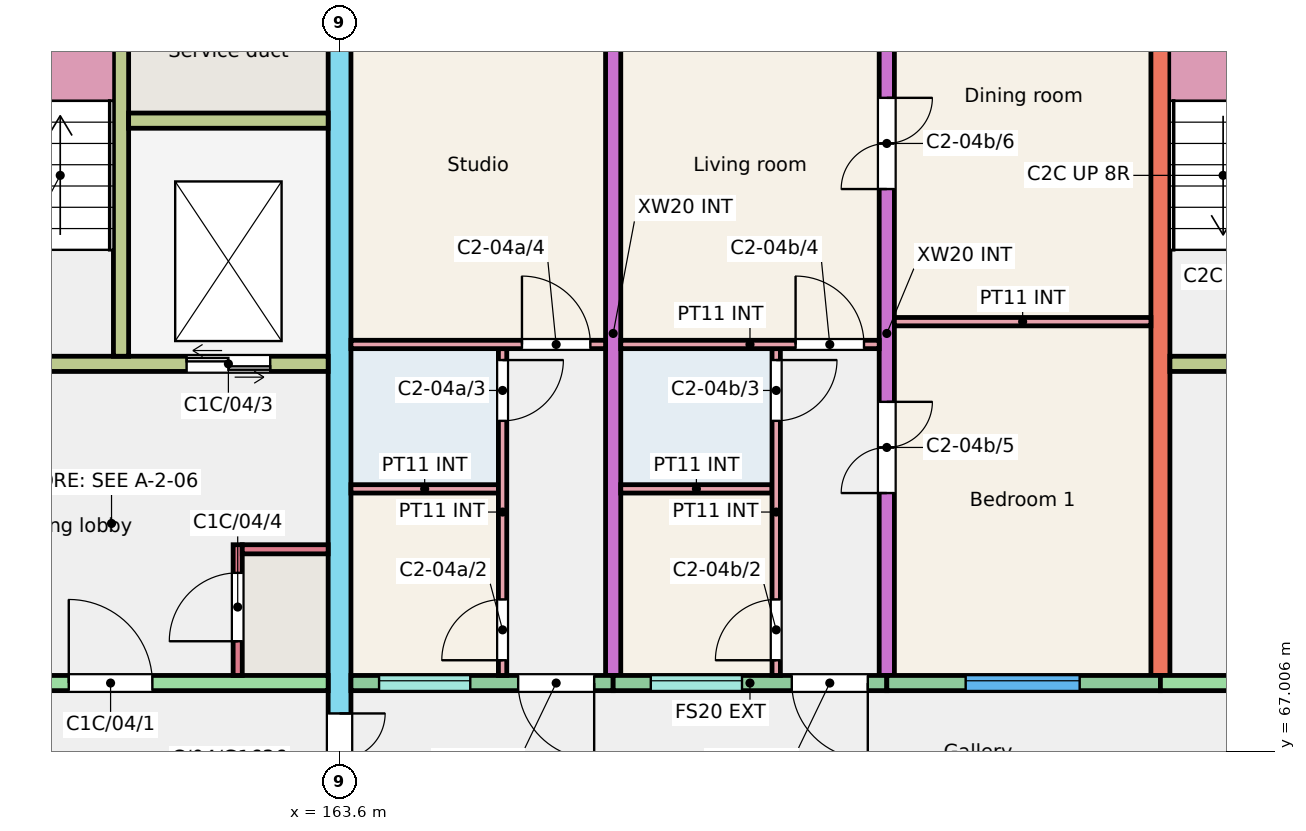
"""IFC4 building model, lengths in metres.
Left out: names, types, materials, properties, quantities, classifications, styles, units other than length and angle.
Written with IfcOpenShell. Run it as: python <this file> out.ifc"""

import sys

from ifc_helpers import new_model, si_unit, direction, frame, frame_2d, origin, place, context, subcontext, project, spatial, rectangle, extrude, element, fill, save


model = new_model("IFC4")
c1 = context("Model", 3, precision=1e-05, world=origin(), true_north=direction((0.0, 1.0)))
c2 = subcontext(c1, "Body", "Model", "MODEL_VIEW")
j1 = project(units=[si_unit("LENGTHUNIT", "METRE"), si_unit("PLANEANGLEUNIT", "RADIAN")], contexts=[c1])
p1 = place(None, origin())
s1 = spatial("IfcSite", under=j1, at=p1, CompositionType="ELEMENT")
p2 = place(p1, origin())
s2 = spatial("IfcBuilding", under=s1, at=p2, CompositionType="ELEMENT")
p3 = place(p2, frame((0.0, 0.0, 12.0)))
s3 = spatial("IfcBuildingStorey", under=s2, at=p3, CompositionType="ELEMENT", Elevation=12.0)
p4 = place(p3, frame((163.6, 66.0, 0.0), z_axis=(0.0, 0.0, 1.0), x_axis=(0.0, 1.0, 0.0)))
e1 = element("IfcWall", 1, at=p4, inside=s3, PredefinedType="SHEAR", context=c2, shape_type="SweptSolid", body=[
    extrude(rectangle(XDim=11.0, YDim=0.3, at=frame_2d((5.5, 0.0))), origin(), (0.0, 0.0, 1.0), 3.0),
])
p5 = place(p4, frame((0.3, 0.0, 0.0)))
e2 = element("IfcOpeningElement", 2, at=p5, cuts=e1, PredefinedType="OPENING", context=c2, shape_type="SweptSolid", body=[
    extrude(rectangle(XDim=1.2, YDim=2.1, at=frame_2d((0.6, 1.05))), frame((0.0, 0.16, 0.0), z_axis=(0.0, -1.0, 0.0), x_axis=(1.0, 0.0, 0.0)), (0.0, 0.0, 1.0), 0.32),
])
p6 = place(p3, frame((167.2, 68.0, 0.0), z_axis=(0.0, 0.0, 1.0), x_axis=(0.0, 1.0, 0.0)))
e3 = element("IfcWall", 3, at=p6, inside=s3, PredefinedType="SHEAR", context=c2, shape_type="SweptSolid", body=[
    extrude(rectangle(XDim=9.0, YDim=0.2, at=frame_2d((4.5, 0.0))), origin(), (0.0, 0.0, 1.0), 3.0),
])
p7 = place(p3, frame((170.8, 68.0, 0.0), z_axis=(0.0, 0.0, 1.0), x_axis=(0.0, 1.0, 0.0)))
e4 = element("IfcWall", 4, at=p7, inside=s3, PredefinedType="SHEAR", context=c2, shape_type="SweptSolid", body=[
    extrude(rectangle(XDim=9.0, YDim=0.2, at=frame_2d((4.5, 0.0))), origin(), (0.0, 0.0, 1.0), 3.0),
])
p8 = place(p7, frame((2.4, 0.0, 0.0)))
e5 = element("IfcOpeningElement", 5, at=p8, cuts=e4, PredefinedType="OPENING", context=c2, shape_type="SweptSolid", body=[
    extrude(rectangle(XDim=1.2, YDim=2.1, at=frame_2d((0.6, 1.05))), frame((0.0, 0.11, 0.0), z_axis=(0.0, -1.0, 0.0), x_axis=(1.0, 0.0, 0.0)), (0.0, 0.0, 1.0), 0.22),
])
p9 = place(p7, frame((6.4, 0.0, 0.0)))
e6 = element("IfcOpeningElement", 6, at=p9, cuts=e4, PredefinedType="OPENING", context=c2, shape_type="SweptSolid", body=[
    extrude(rectangle(XDim=1.2, YDim=2.1, at=frame_2d((0.6, 1.05))), frame((0.0, 0.11, 0.0), z_axis=(0.0, -1.0, 0.0), x_axis=(1.0, 0.0, 0.0)), (0.0, 0.0, 1.0), 0.22),
])
p10 = place(p3, frame((174.4, 68.0, 0.0), z_axis=(0.0, 0.0, 1.0), x_axis=(0.0, 1.0, 0.0)))
e7 = element("IfcWall", 7, at=p10, inside=s3, PredefinedType="SHEAR", context=c2, shape_type="SweptSolid", body=[
    extrude(rectangle(XDim=9.0, YDim=0.25, at=frame_2d((4.5, 0.0))), origin(), (0.0, 0.0, 1.0), 3.0),
])
p11 = place(p3, frame((157.6, 67.9, 0.0), z_axis=(0.0, 0.0, 1.0), x_axis=(1.0, 0.0, 0.0)))
e8 = element("IfcWall", 8, at=p11, inside=s3, PredefinedType="SHEAR", context=c2, shape_type="SweptSolid", body=[
    extrude(rectangle(XDim=5.85, YDim=0.2, at=frame_2d((2.925, 0.0))), origin(), (0.0, 0.0, 1.0), 3.0),
])
p12 = place(p11, frame((2.438, 0.0, 0.0)))
e9 = element("IfcOpeningElement", 9, at=p12, cuts=e8, PredefinedType="OPENING", context=c2, shape_type="SweptSolid", body=[
    extrude(rectangle(XDim=1.1, YDim=2.1, at=frame_2d((0.55, 1.05))), frame((0.0, 0.11, 0.0), z_axis=(0.0, -1.0, 0.0), x_axis=(1.0, 0.0, 0.0)), (0.0, 0.0, 1.0), 0.22),
])
p13 = place(p3, frame((157.725, 72.1, 0.0), z_axis=(0.0, 0.0, 1.0), x_axis=(1.0, 0.0, 0.0)))
e10 = element("IfcWall", 10, at=p13, inside=s3, PredefinedType="SHEAR", context=c2, shape_type="SweptSolid", body=[
    extrude(rectangle(XDim=5.725, YDim=0.2, at=frame_2d((2.862, 0.0))), origin(), (0.0, 0.0, 1.0), 3.0),
])
p14 = place(p13, frame((0.95, 0.0, 0.0)))
e11 = element("IfcOpeningElement", 11, at=p14, cuts=e10, PredefinedType="OPENING", context=c2, shape_type="SweptSolid", body=[
    extrude(rectangle(XDim=1.0, YDim=2.1, at=frame_2d((0.5, 1.05))), frame((0.0, 0.11, 0.0), z_axis=(0.0, -1.0, 0.0), x_axis=(1.0, 0.0, 0.0)), (0.0, 0.0, 1.0), 0.22),
])
p15 = place(p13, frame((3.863, 0.0, 0.0)))
e12 = element("IfcOpeningElement", 12, at=p15, cuts=e10, PredefinedType="OPENING", context=c2, shape_type="SweptSolid", body=[
    extrude(rectangle(XDim=1.1, YDim=2.1, at=frame_2d((0.55, 1.05))), frame((0.0, 0.11, 0.0), z_axis=(0.0, -1.0, 0.0), x_axis=(1.0, 0.0, 0.0)), (0.0, 0.0, 1.0), 0.22),
])
p16 = place(p3, frame((160.725, 72.2, 0.0), z_axis=(0.0, 0.0, 1.0), x_axis=(0.0, 1.0, 0.0)))
e13 = element("IfcWall", 13, at=p16, inside=s3, PredefinedType="SHEAR", context=c2, shape_type="SweptSolid", body=[
    extrude(rectangle(XDim=4.8, YDim=0.2, at=frame_2d((2.4, 0.0))), origin(), (0.0, 0.0, 1.0), 3.0),
])
p17 = place(p3, frame((160.825, 75.3, 0.0), z_axis=(0.0, 0.0, 1.0), x_axis=(1.0, 0.0, 0.0)))
e14 = element("IfcWall", 14, at=p17, inside=s3, PredefinedType="SHEAR", context=c2, shape_type="SweptSolid", body=[
    extrude(rectangle(XDim=2.625, YDim=0.2, at=frame_2d((1.312, 0.0))), origin(), (0.0, 0.0, 1.0), 3.0),
])
p18 = place(p3, frame((162.26, 68.0, 0.0), z_axis=(0.0, 0.0, 1.0), x_axis=(0.0, 1.0, 0.0)))
e15 = element("IfcWall", 15, at=p18, inside=s3, PredefinedType="SHEAR", context=c2, shape_type="SweptSolid", body=[
    extrude(rectangle(XDim=1.72, YDim=0.12, at=frame_2d((0.86, 0.0))), origin(), (0.0, 0.0, 1.0), 3.0),
])
p19 = place(p18, frame((0.45, 0.0, 0.0)))
e16 = element("IfcOpeningElement", 16, at=p19, cuts=e15, PredefinedType="OPENING", context=c2, shape_type="SweptSolid", body=[
    extrude(rectangle(XDim=0.9, YDim=2.1, at=frame_2d((0.45, 1.05))), frame((0.0, 0.07, 0.0), z_axis=(0.0, -1.0, 0.0), x_axis=(1.0, 0.0, 0.0)), (0.0, 0.0, 1.0), 0.14),
])
p20 = place(p3, frame((162.32, 69.66, 0.0), z_axis=(0.0, 0.0, 1.0), x_axis=(1.0, 0.0, 0.0)))
e17 = element("IfcWall", 17, at=p20, inside=s3, PredefinedType="SHEAR", context=c2, shape_type="SweptSolid", body=[
    extrude(rectangle(XDim=1.13, YDim=0.12, at=frame_2d((0.565, 0.0))), origin(), (0.0, 0.0, 1.0), 3.0),
])
p21 = place(p3, frame((163.75, 67.9, 0.0), z_axis=(0.0, 0.0, 1.0), x_axis=(1.0, 0.0, 0.0)))
e18 = element("IfcWall", 18, at=p21, inside=s3, PredefinedType="SOLIDWALL", context=c2, shape_type="SweptSolid", body=[
    extrude(rectangle(XDim=3.45, YDim=0.2, at=frame_2d((1.725, 0.0))), origin(), (0.0, 0.0, 1.0), 3.0),
])
p22 = place(p21, frame((0.37, 0.0, 1.1)))
e19 = element("IfcOpeningElement", 19, at=p22, cuts=e18, PredefinedType="OPENING", context=c2, shape_type="SweptSolid", body=[
    extrude(rectangle(XDim=1.2, YDim=1.3, at=frame_2d((0.6, 0.65))), frame((0.0, 0.11, 0.0), z_axis=(0.0, -1.0, 0.0), x_axis=(1.0, 0.0, 0.0)), (0.0, 0.0, 1.0), 0.22),
])
p23 = place(p21, frame((2.2, 0.0, 0.0)))
e20 = element("IfcOpeningElement", 20, at=p23, cuts=e18, PredefinedType="OPENING", context=c2, shape_type="SweptSolid", body=[
    extrude(rectangle(XDim=1.0, YDim=2.1, at=frame_2d((0.5, 1.05))), frame((0.0, 0.11, 0.0), z_axis=(0.0, -1.0, 0.0), x_axis=(1.0, 0.0, 0.0)), (0.0, 0.0, 1.0), 0.22),
])
p24 = place(p3, frame((167.2, 67.9, 0.0), z_axis=(0.0, 0.0, 1.0), x_axis=(1.0, 0.0, 0.0)))
e21 = element("IfcWall", 21, at=p24, inside=s3, PredefinedType="SOLIDWALL", context=c2, shape_type="SweptSolid", body=[
    extrude(rectangle(XDim=3.6, YDim=0.2, at=frame_2d((1.8, 0.0))), origin(), (0.0, 0.0, 1.0), 3.0),
])
p25 = place(p24, frame((0.495, 0.0, 1.1)))
e22 = element("IfcOpeningElement", 22, at=p25, cuts=e21, PredefinedType="OPENING", context=c2, shape_type="SweptSolid", body=[
    extrude(rectangle(XDim=1.2, YDim=1.3, at=frame_2d((0.6, 0.65))), frame((0.0, 0.11, 0.0), z_axis=(0.0, -1.0, 0.0), x_axis=(1.0, 0.0, 0.0)), (0.0, 0.0, 1.0), 0.22),
])
p26 = place(p24, frame((2.35, 0.0, 0.0)))
e23 = element("IfcOpeningElement", 23, at=p26, cuts=e21, PredefinedType="OPENING", context=c2, shape_type="SweptSolid", body=[
    extrude(rectangle(XDim=1.0, YDim=2.1, at=frame_2d((0.5, 1.05))), frame((0.0, 0.11, 0.0), z_axis=(0.0, -1.0, 0.0), x_axis=(1.0, 0.0, 0.0)), (0.0, 0.0, 1.0), 0.22),
])
p27 = place(p3, frame((170.8, 67.9, 0.0), z_axis=(0.0, 0.0, 1.0), x_axis=(1.0, 0.0, 0.0)))
e24 = element("IfcWall", 24, at=p27, inside=s3, PredefinedType="SOLIDWALL", context=c2, shape_type="SweptSolid", body=[
    extrude(rectangle(XDim=3.6, YDim=0.2, at=frame_2d((1.8, 0.0))), origin(), (0.0, 0.0, 1.0), 3.0),
])
p28 = place(p27, frame((1.038, 0.0, 0.9)))
e25 = element("IfcOpeningElement", 25, at=p28, cuts=e24, PredefinedType="OPENING", context=c2, shape_type="SweptSolid", body=[
    extrude(rectangle(XDim=1.5, YDim=1.5, at=frame_2d((0.75, 0.75))), frame((0.0, 0.11, 0.0), z_axis=(0.0, -1.0, 0.0), x_axis=(1.0, 0.0, 0.0)), (0.0, 0.0, 1.0), 0.22),
])
p29 = place(p3, frame((174.4, 67.9, 0.0), z_axis=(0.0, 0.0, 1.0), x_axis=(1.0, 0.0, 0.0)))
e26 = element("IfcWall", 26, at=p29, inside=s3, PredefinedType="SHEAR", context=c2, shape_type="SweptSolid", body=[
    extrude(rectangle(XDim=5.85, YDim=0.2, at=frame_2d((2.925, 0.0))), origin(), (0.0, 0.0, 1.0), 3.0),
])
p30 = place(p29, frame((2.438, 0.0, 0.0)))
e27 = element("IfcOpeningElement", 27, at=p30, cuts=e26, PredefinedType="OPENING", context=c2, shape_type="SweptSolid", body=[
    extrude(rectangle(XDim=1.1, YDim=2.1, at=frame_2d((0.55, 1.05))), frame((0.0, 0.11, 0.0), z_axis=(0.0, -1.0, 0.0), x_axis=(1.0, 0.0, 0.0)), (0.0, 0.0, 1.0), 0.22),
])
p31 = place(p3, frame((174.525, 72.1, 0.0), z_axis=(0.0, 0.0, 1.0), x_axis=(1.0, 0.0, 0.0)))
e28 = element("IfcWall", 28, at=p31, inside=s3, PredefinedType="SHEAR", context=c2, shape_type="SweptSolid", body=[
    extrude(rectangle(XDim=5.725, YDim=0.2, at=frame_2d((2.863, 0.0))), origin(), (0.0, 0.0, 1.0), 3.0),
])
p32 = place(p31, frame((0.95, 0.0, 0.0)))
e29 = element("IfcOpeningElement", 29, at=p32, cuts=e28, PredefinedType="OPENING", context=c2, shape_type="SweptSolid", body=[
    extrude(rectangle(XDim=1.0, YDim=2.1, at=frame_2d((0.5, 1.05))), frame((0.0, 0.11, 0.0), z_axis=(0.0, -1.0, 0.0), x_axis=(1.0, 0.0, 0.0)), (0.0, 0.0, 1.0), 0.22),
])
p33 = place(p31, frame((3.863, 0.0, 0.0)))
e30 = element("IfcOpeningElement", 30, at=p33, cuts=e28, PredefinedType="OPENING", context=c2, shape_type="SweptSolid", body=[
    extrude(rectangle(XDim=1.1, YDim=2.1, at=frame_2d((0.55, 1.05))), frame((0.0, 0.11, 0.0), z_axis=(0.0, -1.0, 0.0), x_axis=(1.0, 0.0, 0.0)), (0.0, 0.0, 1.0), 0.22),
])
p34 = place(p3, frame((163.75, 70.455, 0.0), z_axis=(0.0, 0.0, 1.0), x_axis=(1.0, 0.0, 0.0)))
e31 = element("IfcWall", 31, at=p34, inside=s3, PredefinedType="PARTITIONING", context=c2, shape_type="SweptSolid", body=[
    extrude(rectangle(XDim=1.94, YDim=0.11, at=frame_2d((0.97, 0.0))), origin(), (0.0, 0.0, 1.0), 2.8),
])
p35 = place(p3, frame((165.745, 68.0, 0.0), z_axis=(0.0, 0.0, 1.0), x_axis=(0.0, 1.0, 0.0)))
e32 = element("IfcWall", 32, at=p35, inside=s3, PredefinedType="PARTITIONING", context=c2, shape_type="SweptSolid", body=[
    extrude(rectangle(XDim=4.3, YDim=0.11, at=frame_2d((2.15, 0.0))), origin(), (0.0, 0.0, 1.0), 2.8),
])
p36 = place(p35, frame((0.2, 0.0, 0.0)))
e33 = element("IfcOpeningElement", 33, at=p36, cuts=e32, PredefinedType="OPENING", context=c2, shape_type="SweptSolid", body=[
    extrude(rectangle(XDim=0.8, YDim=2.1, at=frame_2d((0.4, 1.05))), frame((0.0, 0.065, 0.0), z_axis=(0.0, -1.0, 0.0), x_axis=(1.0, 0.0, 0.0)), (0.0, 0.0, 1.0), 0.13),
])
p37 = place(p35, frame((3.35, 0.0, 0.0)))
e34 = element("IfcOpeningElement", 34, at=p37, cuts=e32, PredefinedType="OPENING", context=c2, shape_type="SweptSolid", body=[
    extrude(rectangle(XDim=0.8, YDim=2.1, at=frame_2d((0.4, 1.05))), frame((0.0, 0.065, 0.0), z_axis=(0.0, -1.0, 0.0), x_axis=(1.0, 0.0, 0.0)), (0.0, 0.0, 1.0), 0.13),
])
p38 = place(p3, frame((163.75, 72.355, 0.0), z_axis=(0.0, 0.0, 1.0), x_axis=(1.0, 0.0, 0.0)))
e35 = element("IfcWall", 35, at=p38, inside=s3, PredefinedType="PARTITIONING", context=c2, shape_type="SweptSolid", body=[
    extrude(rectangle(XDim=3.35, YDim=0.11, at=frame_2d((1.675, 0.0))), origin(), (0.0, 0.0, 1.0), 2.8),
])
p39 = place(p38, frame((2.25, 0.0, 0.0)))
e36 = element("IfcOpeningElement", 36, at=p39, cuts=e35, PredefinedType="OPENING", context=c2, shape_type="SweptSolid", body=[
    extrude(rectangle(XDim=0.9, YDim=2.1, at=frame_2d((0.45, 1.05))), frame((0.0, 0.065, 0.0), z_axis=(0.0, -1.0, 0.0), x_axis=(1.0, 0.0, 0.0)), (0.0, 0.0, 1.0), 0.13),
])
p40 = place(p3, frame((167.3, 70.455, 0.0), z_axis=(0.0, 0.0, 1.0), x_axis=(1.0, 0.0, 0.0)))
e37 = element("IfcWall", 37, at=p40, inside=s3, PredefinedType="PARTITIONING", context=c2, shape_type="SweptSolid", body=[
    extrude(rectangle(XDim=1.99, YDim=0.11, at=frame_2d((0.995, 0.0))), origin(), (0.0, 0.0, 1.0), 2.8),
])
p41 = place(p3, frame((169.345, 68.0, 0.0), z_axis=(0.0, 0.0, 1.0), x_axis=(0.0, 1.0, 0.0)))
e38 = element("IfcWall", 38, at=p41, inside=s3, PredefinedType="PARTITIONING", context=c2, shape_type="SweptSolid", body=[
    extrude(rectangle(XDim=4.3, YDim=0.11, at=frame_2d((2.15, 0.0))), origin(), (0.0, 0.0, 1.0), 2.8),
])
p42 = place(p41, frame((0.2, 0.0, 0.0)))
e39 = element("IfcOpeningElement", 39, at=p42, cuts=e38, PredefinedType="OPENING", context=c2, shape_type="SweptSolid", body=[
    extrude(rectangle(XDim=0.8, YDim=2.1, at=frame_2d((0.4, 1.05))), frame((0.0, 0.065, 0.0), z_axis=(0.0, -1.0, 0.0), x_axis=(1.0, 0.0, 0.0)), (0.0, 0.0, 1.0), 0.13),
])
p43 = place(p41, frame((3.35, 0.0, 0.0)))
e40 = element("IfcOpeningElement", 40, at=p43, cuts=e38, PredefinedType="OPENING", context=c2, shape_type="SweptSolid", body=[
    extrude(rectangle(XDim=0.8, YDim=2.1, at=frame_2d((0.4, 1.05))), frame((0.0, 0.065, 0.0), z_axis=(0.0, -1.0, 0.0), x_axis=(1.0, 0.0, 0.0)), (0.0, 0.0, 1.0), 0.13),
])
p44 = place(p3, frame((167.3, 72.355, 0.0), z_axis=(0.0, 0.0, 1.0), x_axis=(1.0, 0.0, 0.0)))
e41 = element("IfcWall", 41, at=p44, inside=s3, PredefinedType="PARTITIONING", context=c2, shape_type="SweptSolid", body=[
    extrude(rectangle(XDim=3.4, YDim=0.11, at=frame_2d((1.7, 0.0))), origin(), (0.0, 0.0, 1.0), 2.8),
])
p45 = place(p44, frame((2.3, 0.0, 0.0)))
e42 = element("IfcOpeningElement", 42, at=p45, cuts=e41, PredefinedType="OPENING", context=c2, shape_type="SweptSolid", body=[
    extrude(rectangle(XDim=0.9, YDim=2.1, at=frame_2d((0.45, 1.05))), frame((0.0, 0.065, 0.0), z_axis=(0.0, -1.0, 0.0), x_axis=(1.0, 0.0, 0.0)), (0.0, 0.0, 1.0), 0.13),
])
p46 = place(p3, frame((170.9, 72.655, 0.0), z_axis=(0.0, 0.0, 1.0), x_axis=(1.0, 0.0, 0.0)))
e43 = element("IfcWall", 43, at=p46, inside=s3, PredefinedType="PARTITIONING", context=c2, shape_type="SweptSolid", body=[
    extrude(rectangle(XDim=3.375, YDim=0.11, at=frame_2d((1.688, 0.0))), origin(), (0.0, 0.0, 1.0), 2.8),
])
p47 = place(p22, origin())
e44 = element("IfcWindow", 44, at=p47, inside=s3, PartitioningType="SINGLE_PANEL", PredefinedType="WINDOW", context=c2, shape_type="SweptSolid", body=[
    extrude(rectangle(XDim=1.2, YDim=1.3, at=frame_2d((0.6, 0.65))), frame((0.0, 0.06, 0.0), z_axis=(0.0, -1.0, 0.0), x_axis=(1.0, 0.0, 0.0)), (0.0, 0.0, 1.0), 0.06),
])
fill(e19, e44)
p48 = place(p28, origin())
e45 = element("IfcWindow", 45, at=p48, inside=s3, PartitioningType="SINGLE_PANEL", PredefinedType="WINDOW", context=c2, shape_type="SweptSolid", body=[
    extrude(rectangle(XDim=1.5, YDim=1.5, at=frame_2d((0.75, 0.75))), frame((0.0, 0.06, 0.0), z_axis=(0.0, -1.0, 0.0), x_axis=(1.0, 0.0, 0.0)), (0.0, 0.0, 1.0), 0.06),
])
fill(e25, e45)
p49 = place(p25, origin())
e46 = element("IfcWindow", 46, at=p49, inside=s3, PartitioningType="SINGLE_PANEL", PredefinedType="WINDOW", context=c2, shape_type="SweptSolid", body=[
    extrude(rectangle(XDim=1.2, YDim=1.3, at=frame_2d((0.6, 0.65))), frame((0.0, 0.06, 0.0), z_axis=(0.0, -1.0, 0.0), x_axis=(1.0, 0.0, 0.0)), (0.0, 0.0, 1.0), 0.06),
])
fill(e22, e46)
p50 = place(p23, origin())
e47 = element("IfcDoor", 47, at=p50, inside=s3, OperationType="SINGLE_SWING_RIGHT", PredefinedType="DOOR", context=c2, shape_type="SweptSolid", body=[
    extrude(rectangle(XDim=1.0, YDim=2.1, at=frame_2d((0.5, 1.05))), frame((0.0, 0.025, 0.0), z_axis=(0.0, -1.0, 0.0), x_axis=(1.0, 0.0, 0.0)), (0.0, 0.0, 1.0), 0.05),
])
fill(e20, e47)
p51 = place(p36, origin())
e48 = element("IfcDoor", 48, at=p51, inside=s3, OperationType="SINGLE_SWING_LEFT", PredefinedType="DOOR", context=c2, shape_type="SweptSolid", body=[
    extrude(rectangle(XDim=0.8, YDim=2.1, at=frame_2d((0.4, 1.05))), frame((0.0, 0.025, 0.0), z_axis=(0.0, -1.0, 0.0), x_axis=(1.0, 0.0, 0.0)), (0.0, 0.0, 1.0), 0.05),
])
fill(e33, e48)
p52 = place(p37, origin())
e49 = element("IfcDoor", 49, at=p52, inside=s3, OperationType="SINGLE_SWING_RIGHT", PredefinedType="DOOR", context=c2, shape_type="SweptSolid", body=[
    extrude(rectangle(XDim=0.8, YDim=2.1, at=frame_2d((0.4, 1.05))), frame((0.0, 0.025, 0.0), z_axis=(0.0, -1.0, 0.0), x_axis=(1.0, 0.0, 0.0)), (0.0, 0.0, 1.0), 0.05),
])
fill(e34, e49)
p53 = place(p39, origin())
e50 = element("IfcDoor", 50, at=p53, inside=s3, OperationType="SINGLE_SWING_LEFT", PredefinedType="DOOR", context=c2, shape_type="SweptSolid", body=[
    extrude(rectangle(XDim=0.9, YDim=2.1, at=frame_2d((0.45, 1.05))), frame((0.0, 0.025, 0.0), z_axis=(0.0, -1.0, 0.0), x_axis=(1.0, 0.0, 0.0)), (0.0, 0.0, 1.0), 0.05),
])
fill(e36, e50)
p54 = place(p26, origin())
e51 = element("IfcDoor", 51, at=p54, inside=s3, OperationType="SINGLE_SWING_RIGHT", PredefinedType="DOOR", context=c2, shape_type="SweptSolid", body=[
    extrude(rectangle(XDim=1.0, YDim=2.1, at=frame_2d((0.5, 1.05))), frame((0.0, 0.025, 0.0), z_axis=(0.0, -1.0, 0.0), x_axis=(1.0, 0.0, 0.0)), (0.0, 0.0, 1.0), 0.05),
])
fill(e23, e51)
p55 = place(p42, origin())
e52 = element("IfcDoor", 52, at=p55, inside=s3, OperationType="SINGLE_SWING_LEFT", PredefinedType="DOOR", context=c2, shape_type="SweptSolid", body=[
    extrude(rectangle(XDim=0.8, YDim=2.1, at=frame_2d((0.4, 1.05))), frame((0.0, 0.025, 0.0), z_axis=(0.0, -1.0, 0.0), x_axis=(1.0, 0.0, 0.0)), (0.0, 0.0, 1.0), 0.05),
])
fill(e39, e52)
p56 = place(p43, origin())
e53 = element("IfcDoor", 53, at=p56, inside=s3, OperationType="SINGLE_SWING_RIGHT", PredefinedType="DOOR", context=c2, shape_type="SweptSolid", body=[
    extrude(rectangle(XDim=0.8, YDim=2.1, at=frame_2d((0.4, 1.05))), frame((0.0, 0.025, 0.0), z_axis=(0.0, -1.0, 0.0), x_axis=(1.0, 0.0, 0.0)), (0.0, 0.0, 1.0), 0.05),
])
fill(e40, e53)
p57 = place(p45, origin())
e54 = element("IfcDoor", 54, at=p57, inside=s3, OperationType="SINGLE_SWING_LEFT", PredefinedType="DOOR", context=c2, shape_type="SweptSolid", body=[
    extrude(rectangle(XDim=0.9, YDim=2.1, at=frame_2d((0.45, 1.05))), frame((0.0, 0.025, 0.0), z_axis=(0.0, -1.0, 0.0), x_axis=(1.0, 0.0, 0.0)), (0.0, 0.0, 1.0), 0.05),
])
fill(e42, e54)
p58 = place(p8, origin())
e55 = element("IfcDoor", 55, at=p58, inside=s3, OperationType="DOUBLE_DOOR_SINGLE_SWING", PredefinedType="DOOR", context=c2, shape_type="SweptSolid", body=[
    extrude(rectangle(XDim=1.2, YDim=2.1, at=frame_2d((0.6, 1.05))), frame((0.0, 0.025, 0.0), z_axis=(0.0, -1.0, 0.0), x_axis=(1.0, 0.0, 0.0)), (0.0, 0.0, 1.0), 0.05),
])
fill(e5, e55)
p59 = place(p9, origin())
e56 = element("IfcDoor", 56, at=p59, inside=s3, OperationType="DOUBLE_DOOR_SINGLE_SWING", PredefinedType="DOOR", context=c2, shape_type="SweptSolid", body=[
    extrude(rectangle(XDim=1.2, YDim=2.1, at=frame_2d((0.6, 1.05))), frame((0.0, 0.025, 0.0), z_axis=(0.0, -1.0, 0.0), x_axis=(1.0, 0.0, 0.0)), (0.0, 0.0, 1.0), 0.05),
])
fill(e6, e56)
p60 = place(p12, origin())
e57 = element("IfcDoor", 57, at=p60, inside=s3, OperationType="SINGLE_SWING_LEFT", PredefinedType="DOOR", context=c2, shape_type="SweptSolid", body=[
    extrude(rectangle(XDim=1.1, YDim=2.1, at=frame_2d((0.55, 1.05))), frame((0.0, 0.025, 0.0), z_axis=(0.0, -1.0, 0.0), x_axis=(1.0, 0.0, 0.0)), (0.0, 0.0, 1.0), 0.05),
])
fill(e9, e57)
p61 = place(p15, origin())
e58 = element("IfcDoor", 58, at=p61, inside=s3, OperationType="DOUBLE_DOOR_SLIDING", PredefinedType="DOOR", context=c2, shape_type="SweptSolid", body=[
    extrude(rectangle(XDim=1.1, YDim=2.1, at=frame_2d((0.55, 1.05))), frame((0.0, 0.025, 0.0), z_axis=(0.0, -1.0, 0.0), x_axis=(1.0, 0.0, 0.0)), (0.0, 0.0, 1.0), 0.05),
])
fill(e12, e58)
p62 = place(p19, origin())
e59 = element("IfcDoor", 59, at=p62, inside=s3, OperationType="SINGLE_SWING_LEFT", PredefinedType="DOOR", context=c2, shape_type="SweptSolid", body=[
    extrude(rectangle(XDim=0.9, YDim=2.1, at=frame_2d((0.45, 1.05))), frame((0.0, 0.025, 0.0), z_axis=(0.0, -1.0, 0.0), x_axis=(1.0, 0.0, 0.0)), (0.0, 0.0, 1.0), 0.05),
])
fill(e16, e59)
p63 = place(p5, origin())
e60 = element("IfcDoor", 60, at=p63, inside=s3, OperationType="DOUBLE_DOOR_SINGLE_SWING", PredefinedType="DOOR", context=c2, shape_type="SweptSolid", body=[
    extrude(rectangle(XDim=1.2, YDim=2.1, at=frame_2d((0.6, 1.05))), frame((0.0, 0.025, 0.0), z_axis=(0.0, -1.0, 0.0), x_axis=(1.0, 0.0, 0.0)), (0.0, 0.0, 1.0), 0.05),
])
fill(e2, e60)
save(model, sys.argv[1])
